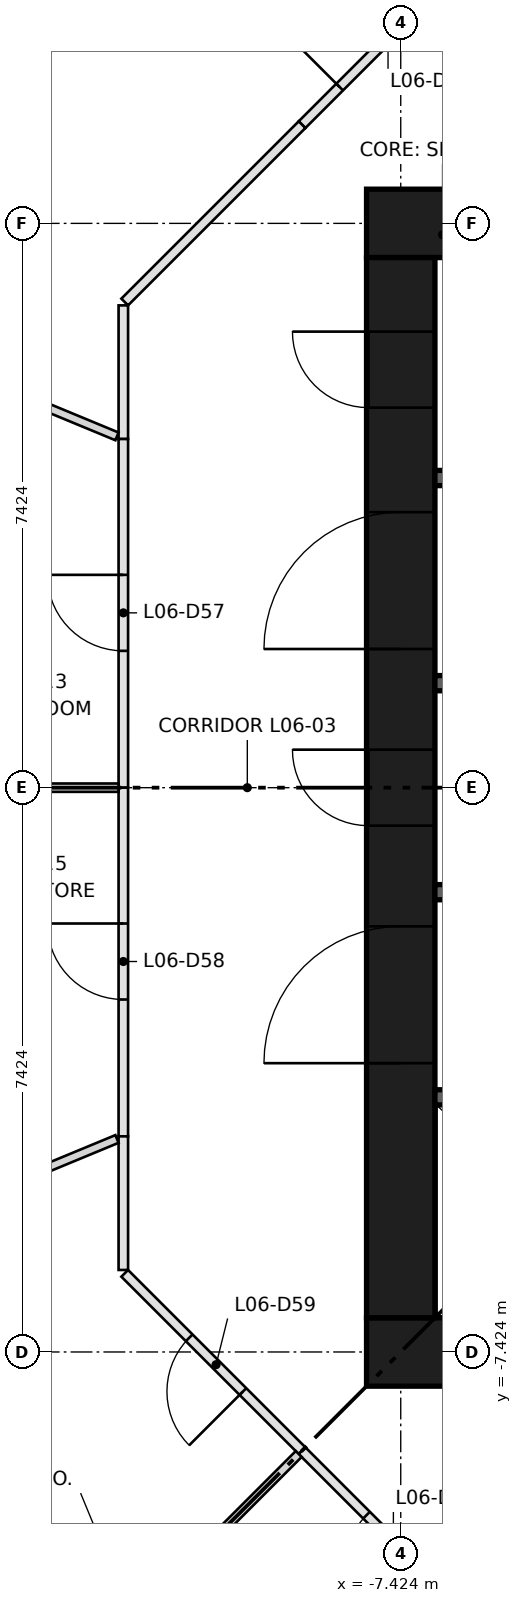
"""IFC4 building model, lengths in metres.
Left out: names, types, materials, properties, quantities, classifications, styles, units other than length and angle.
Written with IfcOpenShell. Run it as: python <this file> out.ifc"""

import sys

from ifc_helpers import new_model, si_unit, direction, frame, frame_2d, origin, place, context, subcontext, project, spatial, rectangle, extrude, element, fill, save


model = new_model("IFC4")
c1 = context("Model", 3, precision=1e-05, world=origin(), true_north=direction((0.0, 1.0)))
c2 = subcontext(c1, "Body", "Model", "MODEL_VIEW")
j1 = project(units=[si_unit("LENGTHUNIT", "METRE"), si_unit("PLANEANGLEUNIT", "RADIAN")], contexts=[c1])
p1 = place(None, origin())
s1 = spatial("IfcSite", under=j1, at=p1, CompositionType="ELEMENT")
p2 = place(p1, origin())
s2 = spatial("IfcBuilding", under=s1, at=p2, CompositionType="ELEMENT")
p3 = place(p2, frame((0.0, 0.0, 26.2)))
s3 = spatial("IfcBuildingStorey", under=s2, at=p3, CompositionType="ELEMENT", Elevation=26.2)
for number, where, z_axis, x_axis in (
    (1, (-7.874, -7.424, 0.0), (0.0, 0.0, 1.0), (1.0, 0.0, 0.0)),
    (2, (-7.874, 7.424, 0.0), (0.0, 0.0, 1.0), (1.0, 0.0, 0.0)),
):
    element("IfcWall", number, at=place(p3, frame(where, z_axis=z_axis, x_axis=x_axis)), inside=s3, PredefinedType="SHEAR", context=c2, shape_type="SweptSolid", body=[
        extrude(rectangle(XDim=15.748, YDim=0.9, at=frame_2d((7.874, 0.0))), origin(), (0.0, 0.0, 1.0), 3.65),
    ])
p4 = place(p3, frame((-7.424, -6.974, 0.0), z_axis=(0.0, 0.0, 1.0), x_axis=(0.0, 1.0, 0.0)))
e3 = element("IfcWall", 3, at=p4, inside=s3, PredefinedType="SHEAR", context=c2, shape_type="SweptSolid", body=[
    extrude(rectangle(XDim=13.948, YDim=0.9, at=frame_2d((6.974, 0.0))), origin(), (0.0, 0.0, 1.0), 3.65),
])
p5 = place(p4, frame((6.474, 0.0, 0.0)))
e4 = element("IfcOpeningElement", 4, at=p5, cuts=e3, PredefinedType="OPENING", context=c2, shape_type="SweptSolid", body=[
    extrude(rectangle(XDim=1.0, YDim=2.1, at=frame_2d((0.5, 1.05))), frame((0.0, 0.46, 0.0), z_axis=(0.0, -1.0, 0.0), x_axis=(1.0, 0.0, 0.0)), (0.0, 0.0, 1.0), 0.92),
])
p6 = place(p4, frame((3.35, 0.0, 0.0)))
e5 = element("IfcOpeningElement", 5, at=p6, cuts=e3, PredefinedType="OPENING", context=c2, shape_type="SweptSolid", body=[
    extrude(rectangle(XDim=1.8, YDim=2.1, at=frame_2d((0.9, 1.05))), frame((0.0, 0.46, 0.0), z_axis=(0.0, -1.0, 0.0), x_axis=(1.0, 0.0, 0.0)), (0.0, 0.0, 1.0), 0.92),
])
p7 = place(p4, frame((8.799, 0.0, 0.0)))
e6 = element("IfcOpeningElement", 6, at=p7, cuts=e3, PredefinedType="OPENING", context=c2, shape_type="SweptSolid", body=[
    extrude(rectangle(XDim=1.8, YDim=2.1, at=frame_2d((0.9, 1.05))), frame((0.0, 0.46, 0.0), z_axis=(0.0, -1.0, 0.0), x_axis=(1.0, 0.0, 0.0)), (0.0, 0.0, 1.0), 0.92),
])
p8 = place(p4, frame((11.974, 0.0, 0.0)))
e7 = element("IfcOpeningElement", 7, at=p8, cuts=e3, PredefinedType="OPENING", context=c2, shape_type="SweptSolid", body=[
    extrude(rectangle(XDim=1.0, YDim=2.1, at=frame_2d((0.5, 1.05))), frame((0.0, 0.46, 0.0), z_axis=(0.0, -1.0, 0.0), x_axis=(1.0, 0.0, 0.0)), (0.0, 0.0, 1.0), 0.92),
])
p9 = place(p3, frame((-6.974, -4.074, 0.0), z_axis=(0.0, 0.0, 1.0), x_axis=(1.0, 0.0, 0.0)))
e8 = element("IfcWall", 8, at=p9, inside=s3, PredefinedType="SHEAR", context=c2, shape_type="SweptSolid", body=[
    extrude(rectangle(XDim=13.948, YDim=0.2, at=frame_2d((6.974, 0.0))), origin(), (0.0, 0.0, 1.0), 3.3),
])
p10 = place(p9, frame((0.918, 0.0, 0.0)))
e9 = element("IfcOpeningElement", 9, at=p10, cuts=e8, PredefinedType="OPENING", context=c2, shape_type="SweptSolid", body=[
    extrude(rectangle(XDim=1.1, YDim=2.1, at=frame_2d((0.55, 1.05))), frame((0.0, 0.11, 0.0), z_axis=(0.0, -1.0, 0.0), x_axis=(1.0, 0.0, 0.0)), (0.0, 0.0, 1.0), 0.22),
])
p11 = place(p9, frame((4.055, 0.0, 0.0)))
e10 = element("IfcOpeningElement", 10, at=p11, cuts=e8, PredefinedType="OPENING", context=c2, shape_type="SweptSolid", body=[
    extrude(rectangle(XDim=1.1, YDim=2.1, at=frame_2d((0.55, 1.05))), frame((0.0, 0.11, 0.0), z_axis=(0.0, -1.0, 0.0), x_axis=(1.0, 0.0, 0.0)), (0.0, 0.0, 1.0), 0.22),
])
p12 = place(p9, frame((6.658, 0.0, 0.0)))
e11 = element("IfcOpeningElement", 11, at=p12, cuts=e8, PredefinedType="OPENING", context=c2, shape_type="SweptSolid", body=[
    extrude(rectangle(XDim=1.0, YDim=2.1, at=frame_2d((0.5, 1.05))), frame((0.0, 0.11, 0.0), z_axis=(0.0, -1.0, 0.0), x_axis=(1.0, 0.0, 0.0)), (0.0, 0.0, 1.0), 0.22),
])
p13 = place(p9, frame((8.627, 0.0, 0.0)))
e12 = element("IfcOpeningElement", 12, at=p13, cuts=e8, PredefinedType="OPENING", context=c2, shape_type="SweptSolid", body=[
    extrude(rectangle(XDim=1.0, YDim=2.1, at=frame_2d((0.5, 1.05))), frame((0.0, 0.11, 0.0), z_axis=(0.0, -1.0, 0.0), x_axis=(1.0, 0.0, 0.0)), (0.0, 0.0, 1.0), 0.22),
])
p14 = place(p9, frame((10.595, 0.0, 0.0)))
e13 = element("IfcOpeningElement", 13, at=p14, cuts=e8, PredefinedType="OPENING", context=c2, shape_type="SweptSolid", body=[
    extrude(rectangle(XDim=1.0, YDim=2.1, at=frame_2d((0.5, 1.05))), frame((0.0, 0.11, 0.0), z_axis=(0.0, -1.0, 0.0), x_axis=(1.0, 0.0, 0.0)), (0.0, 0.0, 1.0), 0.22),
])
p15 = place(p9, frame((12.564, 0.0, 0.0)))
e14 = element("IfcOpeningElement", 14, at=p15, cuts=e8, PredefinedType="OPENING", context=c2, shape_type="SweptSolid", body=[
    extrude(rectangle(XDim=1.0, YDim=2.1, at=frame_2d((0.5, 1.05))), frame((0.0, 0.11, 0.0), z_axis=(0.0, -1.0, 0.0), x_axis=(1.0, 0.0, 0.0)), (0.0, 0.0, 1.0), 0.22),
])
p16 = place(p3, frame((-6.974, 4.074, 0.0), z_axis=(0.0, 0.0, 1.0), x_axis=(1.0, 0.0, 0.0)))
e15 = element("IfcWall", 15, at=p16, inside=s3, PredefinedType="SHEAR", context=c2, shape_type="SweptSolid", body=[
    extrude(rectangle(XDim=6.974, YDim=0.2, at=frame_2d((3.487, 0.0))), origin(), (0.0, 0.0, 1.0), 3.3),
])
for number, where, z_axis, x_axis in (
    (16, (-6.974, -1.375, 0.0), (0.0, 0.0, 1.0), (1.0, 0.0, 0.0)),
    (17, (-6.974, 1.375, 0.0), (0.0, 0.0, 1.0), (1.0, 0.0, 0.0)),
):
    element("IfcWall", number, at=place(p3, frame(where, z_axis=z_axis, x_axis=x_axis)), inside=s3, PredefinedType="SHEAR", context=c2, shape_type="SweptSolid", body=[
        extrude(rectangle(XDim=2.6, YDim=0.2, at=frame_2d((1.3, 0.0))), origin(), (0.0, 0.0, 1.0), 3.3),
    ])
p17 = place(p3, frame((-8.722, 8.722, 0.0), z_axis=(0.0, 0.0, 1.0), x_axis=(0.707069784102, 0.707143776336, 0.0)))
e18 = element("IfcWall", 18, at=p17, inside=s3, PredefinedType="PARTITIONING", context=c2, shape_type="SweptSolid", body=[
    extrude(rectangle(XDim=3.3, YDim=0.125, at=frame_2d((1.65, 0.0))), origin(), (0.0, 0.0, 1.0), 3.3),
])
p18 = place(p17, frame((0.7, 0.0, 0.0)))
e19 = element("IfcOpeningElement", 19, at=p18, cuts=e18, PredefinedType="OPENING", context=c2, shape_type="SweptSolid", body=[
    extrude(rectangle(XDim=1.8, YDim=2.1, at=frame_2d((0.9, 1.05))), frame((0.0, 0.073, 0.0), z_axis=(0.0, -1.0, 0.0), x_axis=(1.0, 0.0, 0.0)), (0.0, 0.0, 1.0), 0.145),
])
p19 = place(p3, frame((-11.074, 4.587, 0.0), z_axis=(0.0, 0.0, 1.0), x_axis=(0.0, 1.0, 0.0)))
e20 = element("IfcWall", 20, at=p19, inside=s3, PredefinedType="PARTITIONING", context=c2, shape_type="SweptSolid", body=[
    extrude(rectangle(XDim=1.758, YDim=0.125, at=frame_2d((0.879, 0.0))), origin(), (0.0, 0.0, 1.0), 3.3),
])
p20 = place(p3, frame((-11.056, 6.389, 0.0), z_axis=(0.0, 0.0, 1.0), x_axis=(0.707143776336, 0.707069784102, 0.0)))
e21 = element("IfcWall", 21, at=p20, inside=s3, PredefinedType="PARTITIONING", context=c2, shape_type="SweptSolid", body=[
    extrude(rectangle(XDim=3.3, YDim=0.125, at=frame_2d((1.65, 0.0))), origin(), (0.0, 0.0, 1.0), 3.3),
])
p21 = place(p3, frame((-11.074, 0.0, 0.0), z_axis=(0.0, 0.0, 1.0), x_axis=(0.0, 1.0, 0.0)))
e22 = element("IfcWall", 22, at=p21, inside=s3, PredefinedType="PARTITIONING", context=c2, shape_type="SweptSolid", body=[
    extrude(rectangle(XDim=4.587, YDim=0.125, at=frame_2d((2.293, 0.0))), origin(), (0.0, 0.0, 1.0), 3.3),
])
p22 = place(p21, frame((1.8, 0.0, 0.0)))
e23 = element("IfcOpeningElement", 23, at=p22, cuts=e22, PredefinedType="OPENING", context=c2, shape_type="SweptSolid", body=[
    extrude(rectangle(XDim=1.0, YDim=2.1, at=frame_2d((0.5, 1.05))), frame((0.0, 0.073, 0.0), z_axis=(0.0, -1.0, 0.0), x_axis=(1.0, 0.0, 0.0)), (0.0, 0.0, 1.0), 0.145),
])
p23 = place(p3, frame((-11.074, -4.587, 0.0), z_axis=(0.0, 0.0, 1.0), x_axis=(0.0, 1.0, 0.0)))
e24 = element("IfcWall", 24, at=p23, inside=s3, PredefinedType="PARTITIONING", context=c2, shape_type="SweptSolid", body=[
    extrude(rectangle(XDim=4.587, YDim=0.125, at=frame_2d((2.293, 0.0))), origin(), (0.0, 0.0, 1.0), 3.3),
])
p24 = place(p23, frame((1.8, 0.0, 0.0)))
e25 = element("IfcOpeningElement", 25, at=p24, cuts=e24, PredefinedType="OPENING", context=c2, shape_type="SweptSolid", body=[
    extrude(rectangle(XDim=1.0, YDim=2.1, at=frame_2d((0.5, 1.05))), frame((0.0, 0.073, 0.0), z_axis=(0.0, -1.0, 0.0), x_axis=(1.0, 0.0, 0.0)), (0.0, 0.0, 1.0), 0.145),
])
p25 = place(p3, frame((-11.074, -6.345, 0.0), z_axis=(0.0, 0.0, 1.0), x_axis=(0.0, 1.0, 0.0)))
e26 = element("IfcWall", 26, at=p25, inside=s3, PredefinedType="PARTITIONING", context=c2, shape_type="SweptSolid", body=[
    extrude(rectangle(XDim=1.758, YDim=0.125, at=frame_2d((0.879, 0.0))), origin(), (0.0, 0.0, 1.0), 3.3),
])
p26 = place(p3, frame((-8.722, -8.722, 0.0), z_axis=(0.0, 0.0, 1.0), x_axis=(-0.707143776336, 0.707069784102, 0.0)))
e27 = element("IfcWall", 27, at=p26, inside=s3, PredefinedType="PARTITIONING", context=c2, shape_type="SweptSolid", body=[
    extrude(rectangle(XDim=3.3, YDim=0.125, at=frame_2d((1.65, 0.0))), origin(), (0.0, 0.0, 1.0), 3.3),
])
p27 = place(p26, frame((1.1, 0.0, 0.0)))
e28 = element("IfcOpeningElement", 28, at=p27, cuts=e27, PredefinedType="OPENING", context=c2, shape_type="SweptSolid", body=[
    extrude(rectangle(XDim=1.0, YDim=2.1, at=frame_2d((0.5, 1.05))), frame((0.0, 0.073, 0.0), z_axis=(0.0, -1.0, 0.0), x_axis=(1.0, 0.0, 0.0)), (0.0, 0.0, 1.0), 0.145),
])
p28 = place(p3, frame((-6.389, -11.056, 0.0), z_axis=(0.0, 0.0, 1.0), x_axis=(-0.707069784102, 0.707143776336, 0.0)))
e29 = element("IfcWall", 29, at=p28, inside=s3, PredefinedType="PARTITIONING", context=c2, shape_type="SweptSolid", body=[
    extrude(rectangle(XDim=3.3, YDim=0.125, at=frame_2d((1.65, 0.0))), origin(), (0.0, 0.0, 1.0), 3.3),
])
p29 = place(p28, frame((1.1, 0.0, 0.0)))
e30 = element("IfcOpeningElement", 30, at=p29, cuts=e29, PredefinedType="OPENING", context=c2, shape_type="SweptSolid", body=[
    extrude(rectangle(XDim=1.0, YDim=2.1, at=frame_2d((0.5, 1.05))), frame((0.0, 0.073, 0.0), z_axis=(0.0, -1.0, 0.0), x_axis=(1.0, 0.0, 0.0)), (0.0, 0.0, 1.0), 0.145),
])
p30 = place(p3, frame((-11.157, 4.622, 0.0), z_axis=(0.0, 0.0, 1.0), x_axis=(-0.923876757744, 0.382690131178, 0.0)))
e31 = element("IfcWall", 31, at=p30, inside=s3, PredefinedType="PARTITIONING", context=c2, shape_type="SweptSolid", body=[
    extrude(rectangle(XDim=1.423, YDim=0.11, at=frame_2d((0.712, 0.0))), origin(), (0.0, 0.0, 1.0), 3.3),
])
p31 = place(p3, frame((-11.136, 0.0, 0.0), z_axis=(0.0, 0.0, 1.0), x_axis=(-1.0, 0.0, 0.0)))
e32 = element("IfcWall", 32, at=p31, inside=s3, PredefinedType="PARTITIONING", context=c2, shape_type="SweptSolid", body=[
    extrude(rectangle(XDim=2.305, YDim=0.11, at=frame_2d((1.152, 0.0))), origin(), (0.0, 0.0, 1.0), 3.3),
])
p32 = place(p3, frame((-11.157, -4.622, 0.0), z_axis=(0.0, 0.0, 1.0), x_axis=(-0.923876757744, -0.382690131178, 0.0)))
e33 = element("IfcWall", 33, at=p32, inside=s3, PredefinedType="PARTITIONING", context=c2, shape_type="SweptSolid", body=[
    extrude(rectangle(XDim=1.423, YDim=0.11, at=frame_2d((0.712, 0.0))), origin(), (0.0, 0.0, 1.0), 3.3),
])
p33 = place(p3, frame((-13.131, -13.131, 0.0), z_axis=(0.0, 0.0, 1.0), x_axis=(0.707106781187, 0.707106781187, 0.0)))
e34 = element("IfcWall", 34, at=p33, inside=s3, PredefinedType="PARTITIONING", context=c2, shape_type="SweptSolid", body=[
    extrude(rectangle(XDim=6.172, YDim=0.11, at=frame_2d((3.086, 0.0))), origin(), (0.0, 0.0, 1.0), 3.3),
])
p34 = place(p5, origin())
e35 = element("IfcDoor", 35, at=p34, inside=s3, OperationType="SINGLE_SWING_RIGHT", PredefinedType="DOOR", context=c2, shape_type="SweptSolid", body=[
    extrude(rectangle(XDim=1.0, YDim=2.1, at=frame_2d((0.5, 1.05))), frame((0.0, 0.45, 0.0), z_axis=(0.0, -1.0, 0.0), x_axis=(1.0, 0.0, 0.0)), (0.0, 0.0, 1.0), 0.05),
])
fill(e4, e35)
p35 = place(p6, origin())
e36 = element("IfcDoor", 36, at=p35, inside=s3, OperationType="DOUBLE_DOOR_SINGLE_SWING", PredefinedType="DOOR", context=c2, shape_type="SweptSolid", body=[
    extrude(rectangle(XDim=1.8, YDim=2.1, at=frame_2d((0.9, 1.05))), frame((0.0, 0.025, 0.0), z_axis=(0.0, -1.0, 0.0), x_axis=(1.0, 0.0, 0.0)), (0.0, 0.0, 1.0), 0.05),
])
fill(e5, e36)
p36 = place(p7, origin())
e37 = element("IfcDoor", 37, at=p36, inside=s3, OperationType="DOUBLE_DOOR_SINGLE_SWING", PredefinedType="DOOR", context=c2, shape_type="SweptSolid", body=[
    extrude(rectangle(XDim=1.8, YDim=2.1, at=frame_2d((0.9, 1.05))), frame((0.0, 0.025, 0.0), z_axis=(0.0, -1.0, 0.0), x_axis=(1.0, 0.0, 0.0)), (0.0, 0.0, 1.0), 0.05),
])
fill(e6, e37)
p37 = place(p8, origin())
e38 = element("IfcDoor", 38, at=p37, inside=s3, OperationType="SINGLE_SWING_RIGHT", PredefinedType="DOOR", context=c2, shape_type="SweptSolid", body=[
    extrude(rectangle(XDim=1.0, YDim=2.1, at=frame_2d((0.5, 1.05))), frame((0.0, 0.45, 0.0), z_axis=(0.0, -1.0, 0.0), x_axis=(1.0, 0.0, 0.0)), (0.0, 0.0, 1.0), 0.05),
])
fill(e7, e38)
p38 = place(p18, origin())
e39 = element("IfcDoor", 39, at=p38, inside=s3, OperationType="DOUBLE_DOOR_SINGLE_SWING", PredefinedType="DOOR", context=c2, shape_type="SweptSolid", body=[
    extrude(rectangle(XDim=1.8, YDim=2.1, at=frame_2d((0.9, 1.05))), frame((0.0, 0.025, 0.0), z_axis=(0.0, -1.0, 0.0), x_axis=(1.0, 0.0, 0.0)), (0.0, 0.0, 1.0), 0.05),
])
fill(e19, e39)
p39 = place(p22, origin())
e40 = element("IfcDoor", 40, at=p39, inside=s3, OperationType="SINGLE_SWING_RIGHT", PredefinedType="DOOR", context=c2, shape_type="SweptSolid", body=[
    extrude(rectangle(XDim=1.0, YDim=2.1, at=frame_2d((0.5, 1.05))), frame((0.0, 0.025, 0.0), z_axis=(0.0, -1.0, 0.0), x_axis=(1.0, 0.0, 0.0)), (0.0, 0.0, 1.0), 0.05),
])
fill(e23, e40)
p40 = place(p24, origin())
e41 = element("IfcDoor", 41, at=p40, inside=s3, OperationType="SINGLE_SWING_RIGHT", PredefinedType="DOOR", context=c2, shape_type="SweptSolid", body=[
    extrude(rectangle(XDim=1.0, YDim=2.1, at=frame_2d((0.5, 1.05))), frame((0.0, 0.025, 0.0), z_axis=(0.0, -1.0, 0.0), x_axis=(1.0, 0.0, 0.0)), (0.0, 0.0, 1.0), 0.05),
])
fill(e25, e41)
p41 = place(p27, origin())
e42 = element("IfcDoor", 42, at=p41, inside=s3, OperationType="SINGLE_SWING_LEFT", PredefinedType="DOOR", context=c2, shape_type="SweptSolid", body=[
    extrude(rectangle(XDim=1.0, YDim=2.1, at=frame_2d((0.5, 1.05))), frame((0.0, 0.025, 0.0), z_axis=(0.0, -1.0, 0.0), x_axis=(1.0, 0.0, 0.0)), (0.0, 0.0, 1.0), 0.05),
])
fill(e28, e42)
p42 = place(p29, origin())
e43 = element("IfcDoor", 43, at=p42, inside=s3, OperationType="SINGLE_SWING_LEFT", PredefinedType="DOOR", context=c2, shape_type="SweptSolid", body=[
    extrude(rectangle(XDim=1.0, YDim=2.1, at=frame_2d((0.5, 1.05))), frame((0.0, 0.025, 0.0), z_axis=(0.0, -1.0, 0.0), x_axis=(1.0, 0.0, 0.0)), (0.0, 0.0, 1.0), 0.05),
])
fill(e30, e43)
save(model, sys.argv[1])
